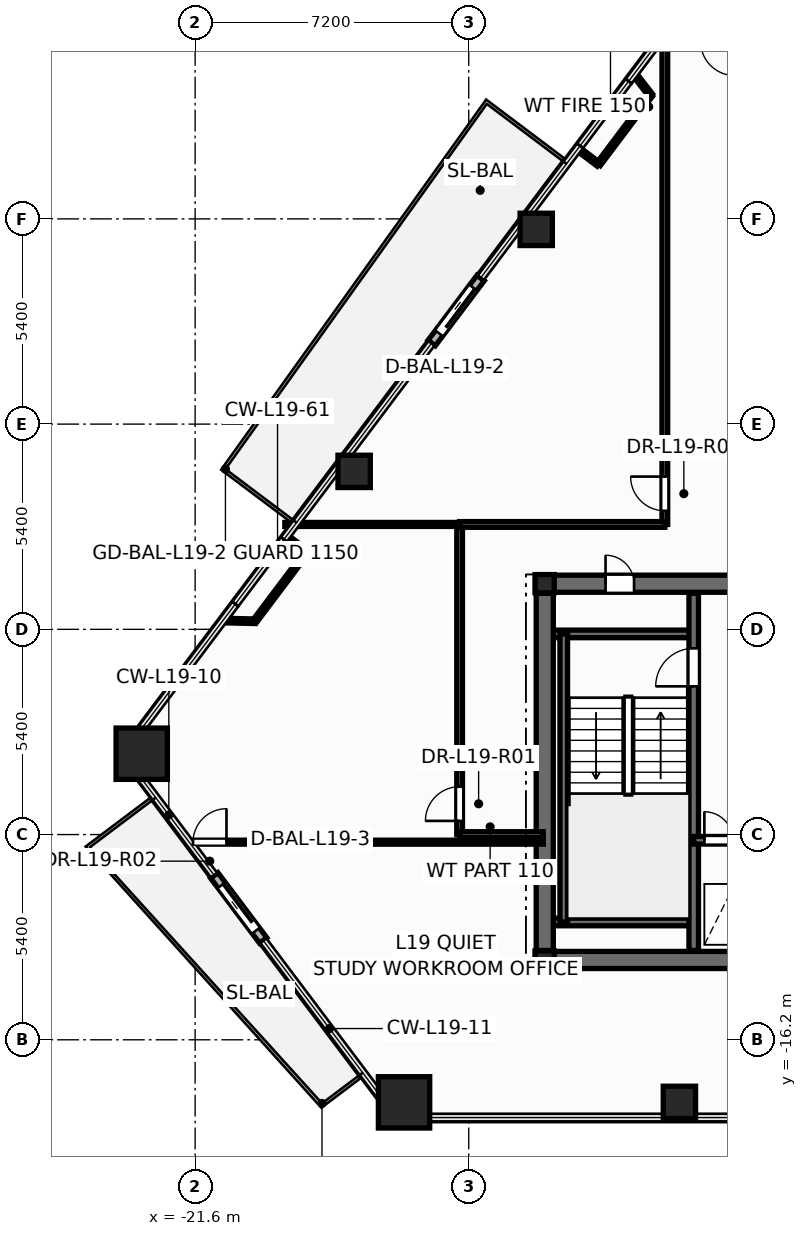
"""IFC4 building model, lengths in metres.
Left out: names, types, materials, properties, quantities, classifications, styles, units other than length and angle.
Written with IfcOpenShell. Run it as: python <this file> out.ifc"""

import sys

from ifc_helpers import new_model, si_unit, direction, frame, frame_2d, origin, origin_2d, place, context, subcontext, project, spatial, rectangle, hollow_rectangle, hollow_circle, i_section, extrude, element, fill, save


model = new_model("IFC4")
c1 = context("Model", 3, precision=1e-05, world=origin(), true_north=direction((0.0, 1.0)))
c2 = subcontext(c1, "Body", "Model", "MODEL_VIEW")
j1 = project(units=[si_unit("LENGTHUNIT", "METRE"), si_unit("PLANEANGLEUNIT", "RADIAN")], contexts=[c1])
p1 = place(None, origin())
s1 = spatial("IfcSite", under=j1, at=p1, CompositionType="ELEMENT")
p2 = place(p1, origin())
s2 = spatial("IfcBuilding", under=s1, at=p2, CompositionType="ELEMENT")
p3 = place(p2, frame((0.0, 0.0, 75.6)))
s3 = spatial("IfcBuildingStorey", under=s2, at=p3, CompositionType="ELEMENT", Elevation=75.6)
for number, where, z_axis, x_axis in (
    (1, (-23.005, -8.673, 0.0), (0.0, 0.0, 1.0), (1.0, 0.0, 0.0)),
    (2, (-16.103, -17.847, 0.0), (0.0, 0.0, 1.0), (1.0, 0.0, 0.0)),
):
    element("IfcColumn", number, at=place(p3, frame(where, z_axis=z_axis, x_axis=x_axis)), inside=s3, PredefinedType="COLUMN", context=c2, shape_type="SweptSolid", body=[
        extrude(hollow_rectangle(XDim=1.35, YDim=1.35, WallThickness=0.065, at=origin_2d()), origin(), (0.0, 0.0, 1.0), 3.6),
    ])
for number, where, z_axis, x_axis in (
    (3, (-8.856, -17.847, 0.0), (0.0, 0.0, 1.0), (1.0, 0.0, 0.0)),
    (4, (-12.624, 5.124, 0.0), (0.0, 0.0, 1.0), (1.0, 0.0, 0.0)),
    (5, (-17.416, -1.244, 0.0), (0.0, 0.0, 1.0), (1.0, 0.0, 0.0)),
):
    element("IfcColumn", number, at=place(p3, frame(where, z_axis=z_axis, x_axis=x_axis)), inside=s3, PredefinedType="COLUMN", context=c2, shape_type="SweptSolid", body=[
        extrude(hollow_circle(Radius=0.425, WallThickness=0.038, at=origin_2d()), origin(), (0.0, 0.0, 1.0), 3.6),
    ])
for number, where, z_axis, x_axis in (
    (6, (-12.4, -14.1, 0.0), (0.0, 0.0, 1.0), (1.0, 0.0, 0.0)),
    (7, (-12.4, -4.2, 0.0), (0.0, 0.0, 1.0), (1.0, 0.0, 0.0)),
):
    element("IfcColumn", number, at=place(p3, frame(where, z_axis=z_axis, x_axis=x_axis)), inside=s3, PredefinedType="COLUMN", context=c2, shape_type="SweptSolid", body=[
        extrude(i_section(OverallWidth=0.5, OverallDepth=0.482, WebThickness=0.04, FlangeThickness=0.045, at=origin_2d()), origin(), (0.0, 0.0, 1.0), 3.6),
    ])
p4 = place(p3, frame((-14.088, 3.844, -0.015), z_axis=(0.0, 0.0, 1.0), x_axis=(-0.601240548581, -0.799068083921, 0.0)))
e8 = element("IfcWall", 8, at=p4, inside=s3, PredefinedType="STANDARD", context=c2, shape_type="SweptSolid", body=[
    extrude(rectangle(XDim=2.14, YDim=0.24, at=frame_2d((1.07, 0.0))), origin(), (0.0, 0.0, 1.0), 2.729),
])
p5 = place(p4, frame((0.32, 0.0, 0.015)))
e9 = element("IfcOpeningElement", 9, at=p5, cuts=e8, PredefinedType="OPENING", context=c2, shape_type="SweptSolid", body=[
    extrude(rectangle(XDim=1.506, YDim=2.204, at=frame_2d((0.75, 1.102))), frame((0.0, 0.13, 0.0), z_axis=(0.0, -1.0, 0.0), x_axis=(1.0, 0.0, 0.0)), (0.0, 0.0, 1.0), 0.26),
])
p6 = place(p3, frame((-21.096, -11.875, -0.015), z_axis=(0.0, 0.0, 1.0), x_axis=(0.601240548581, -0.799068083921, 0.0)))
e10 = element("IfcWall", 10, at=p6, inside=s3, PredefinedType="STANDARD", context=c2, shape_type="SweptSolid", body=[
    extrude(rectangle(XDim=2.14, YDim=0.24, at=frame_2d((1.07, 0.0))), origin(), (0.0, 0.0, 1.0), 2.729),
])
p7 = place(p6, frame((0.32, 0.0, 0.015)))
e11 = element("IfcOpeningElement", 11, at=p7, cuts=e10, PredefinedType="OPENING", context=c2, shape_type="SweptSolid", body=[
    extrude(rectangle(XDim=1.506, YDim=2.204, at=frame_2d((0.75, 1.102))), frame((0.0, 0.13, 0.0), z_axis=(0.0, -1.0, 0.0), x_axis=(1.0, 0.0, 0.0)), (0.0, 0.0, 1.0), 0.26),
])
p8 = place(p3, frame((-12.65, -14.1, 0.0), z_axis=(0.0, 0.0, 1.0), x_axis=(1.0, 0.0, 0.0)))
e12 = element("IfcWall", 12, at=p8, inside=s3, PredefinedType="SHEAR", context=c2, shape_type="SweptSolid", body=[
    extrude(rectangle(XDim=25.3, YDim=0.45, at=frame_2d((12.65, 0.0))), origin(), (0.0, 0.0, 1.0), 3.6),
])
p9 = place(p3, frame((-12.65, -4.2, 0.0), z_axis=(0.0, 0.0, 1.0), x_axis=(1.0, 0.0, 0.0)))
e13 = element("IfcWall", 13, at=p9, inside=s3, PredefinedType="SHEAR", context=c2, shape_type="SweptSolid", body=[
    extrude(rectangle(XDim=25.3, YDim=0.45, at=frame_2d((12.65, 0.0))), origin(), (0.0, 0.0, 1.0), 3.6),
])
p10 = place(p9, frame((1.85, 0.0, 0.0)))
e14 = element("IfcOpeningElement", 14, at=p10, cuts=e13, PredefinedType="OPENING", context=c2, shape_type="SweptSolid", body=[
    extrude(rectangle(XDim=0.756, YDim=2.054, at=frame_2d((0.375, 1.027))), frame((0.0, 0.235, 0.0), z_axis=(0.0, -1.0, 0.0), x_axis=(1.0, 0.0, 0.0)), (0.0, 0.0, 1.0), 0.47),
])
p11 = place(p9, frame((21.85, 0.0, 0.0)))
e15 = element("IfcOpeningElement", 15, at=p11, cuts=e13, PredefinedType="OPENING", context=c2, shape_type="SweptSolid", body=[
    extrude(rectangle(XDim=0.756, YDim=2.054, at=frame_2d((0.375, 1.027))), frame((0.0, 0.235, 0.0), z_axis=(0.0, -1.0, 0.0), x_axis=(1.0, 0.0, 0.0)), (0.0, 0.0, 1.0), 0.47),
])
p12 = place(p9, frame((23.5, 0.0, 0.0)))
e16 = element("IfcOpeningElement", 16, at=p12, cuts=e13, PredefinedType="OPENING", context=c2, shape_type="SweptSolid", body=[
    extrude(rectangle(XDim=0.756, YDim=2.054, at=frame_2d((0.375, 1.027))), frame((0.0, 0.235, 0.0), z_axis=(0.0, -1.0, 0.0), x_axis=(1.0, 0.0, 0.0)), (0.0, 0.0, 1.0), 0.47),
])
p13 = place(p9, frame((5.85, 0.0, 0.0)))
e17 = element("IfcOpeningElement", 17, at=p13, cuts=e13, PredefinedType="OPENING", context=c2, shape_type="SweptSolid", body=[
    extrude(rectangle(XDim=1.006, YDim=2.104, at=frame_2d((0.5, 1.052))), frame((0.0, 0.235, 0.0), z_axis=(0.0, -1.0, 0.0), x_axis=(1.0, 0.0, 0.0)), (0.0, 0.0, 1.0), 0.47),
])
p14 = place(p9, frame((10.35, 0.0, 0.0)))
e18 = element("IfcOpeningElement", 18, at=p14, cuts=e13, PredefinedType="OPENING", context=c2, shape_type="SweptSolid", body=[
    extrude(rectangle(XDim=1.406, YDim=2.154, at=frame_2d((0.7, 1.077))), frame((0.0, 0.235, 0.0), z_axis=(0.0, -1.0, 0.0), x_axis=(1.0, 0.0, 0.0)), (0.0, 0.0, 1.0), 0.47),
])
p15 = place(p9, frame((18.45, 0.0, 0.0)))
e19 = element("IfcOpeningElement", 19, at=p15, cuts=e13, PredefinedType="OPENING", context=c2, shape_type="SweptSolid", body=[
    extrude(rectangle(XDim=1.006, YDim=2.104, at=frame_2d((0.5, 1.052))), frame((0.0, 0.235, 0.0), z_axis=(0.0, -1.0, 0.0), x_axis=(1.0, 0.0, 0.0)), (0.0, 0.0, 1.0), 0.47),
])
for number, where, z_axis, x_axis in (
    (20, (-12.35, -5.52, 0.0), (0.0, 0.0, 1.0), (1.0, 0.0, 0.0)),
    (21, (-12.35, -13.1, 0.0), (0.0, 0.0, 1.0), (1.0, 0.0, 0.0)),
):
    element("IfcWall", number, at=place(p3, frame(where, z_axis=z_axis, x_axis=x_axis)), inside=s3, PredefinedType="SOLIDWALL", context=c2, shape_type="SweptSolid", body=[
        extrude(rectangle(XDim=3.87, YDim=0.2, at=frame_2d((1.935, 0.0))), origin(), (0.0, 0.0, 1.0), 3.6),
    ])
p16 = place(p3, frame((-11.9, -13.1, 0.0), z_axis=(0.0, 0.0, 1.0), x_axis=(0.0, 1.0, 0.0)))
e22 = element("IfcWall", 22, at=p16, inside=s3, PredefinedType="SOLIDWALL", context=c2, shape_type="SweptSolid", body=[
    extrude(rectangle(XDim=7.58, YDim=0.2, at=frame_2d((3.79, 0.0))), origin(), (0.0, 0.0, 1.0), 3.6),
])
p17 = place(p3, frame((-8.48, -13.85, 0.0), z_axis=(0.0, 0.0, 1.0), x_axis=(0.0, 1.0, 0.0)))
e23 = element("IfcWall", 23, at=p17, inside=s3, PredefinedType="SHEAR", context=c2, shape_type="SweptSolid", body=[
    extrude(rectangle(XDim=9.4, YDim=0.25, at=frame_2d((4.7, 0.0))), origin(), (0.0, 0.0, 1.0), 3.6),
])
p18 = place(p17, frame((6.95, 0.0, 0.0)))
e24 = element("IfcOpeningElement", 24, at=p18, cuts=e23, PredefinedType="OPENING", context=c2, shape_type="SweptSolid", body=[
    extrude(rectangle(XDim=1.006, YDim=2.104, at=frame_2d((0.5, 1.052))), frame((0.0, 0.135, 0.0), z_axis=(0.0, -1.0, 0.0), x_axis=(1.0, 0.0, 0.0)), (0.0, 0.0, 1.0), 0.27),
])
p19 = place(p3, frame((-8.48, -10.95, 0.0), z_axis=(0.0, 0.0, 1.0), x_axis=(1.0, 0.0, 0.0)))
e25 = element("IfcWall", 25, at=p19, inside=s3, PredefinedType="SOLIDWALL", context=c2, shape_type="SweptSolid", body=[
    extrude(rectangle(XDim=3.36, YDim=0.2, at=frame_2d((1.68, 0.0))), origin(), (0.0, 0.0, 1.0), 3.6),
])
p20 = place(p19, frame((0.28, 0.0, 0.0)))
e26 = element("IfcOpeningElement", 26, at=p20, cuts=e25, PredefinedType="OPENING", context=c2, shape_type="SweptSolid", body=[
    extrude(rectangle(XDim=0.756, YDim=2.054, at=frame_2d((0.375, 1.027))), frame((0.0, 0.11, 0.0), z_axis=(0.0, -1.0, 0.0), x_axis=(1.0, 0.0, 0.0)), (0.0, 0.0, 1.0), 0.22),
])
p21 = place(p19, frame((1.85, 0.0, 0.0)))
e27 = element("IfcOpeningElement", 27, at=p21, cuts=e25, PredefinedType="OPENING", context=c2, shape_type="SweptSolid", body=[
    extrude(rectangle(XDim=1.106, YDim=2.104, at=frame_2d((0.55, 1.052))), frame((0.0, 0.11, 0.0), z_axis=(0.0, -1.0, 0.0), x_axis=(1.0, 0.0, 0.0)), (0.0, 0.0, 1.0), 0.22),
])
p22 = place(p3, frame((-12.4, -13.85, 0.0), z_axis=(0.0, 0.0, 1.0), x_axis=(0.0, 1.0, 0.0)))
e28 = element("IfcWall", 28, at=p22, inside=s3, PredefinedType="SHEAR", context=c2, shape_type="SweptSolid", body=[
    extrude(rectangle(XDim=9.4, YDim=0.45, at=frame_2d((4.7, 0.0))), origin(), (0.0, 0.0, 1.0), 3.6),
])
p23 = place(p3, frame((-9.24, -2.64, 0.0), z_axis=(0.0, 0.0, 1.0), x_axis=(0.0, 1.0, 0.0)))
e29 = element("IfcWall", 29, at=p23, inside=s3, PredefinedType="PARTITIONING", context=c2, shape_type="SweptSolid", body=[
    extrude(rectangle(XDim=12.927, YDim=0.15, at=frame_2d((6.463, 0.0))), origin(), (0.0, 0.0, 1.0), 2.509),
])
p24 = place(p23, frame((0.359, 0.0, 0.0)))
e30 = element("IfcOpeningElement", 30, at=p24, cuts=e29, PredefinedType="OPENING", context=c2, shape_type="SweptSolid", body=[
    extrude(rectangle(XDim=0.906, YDim=2.104, at=frame_2d((0.45, 1.052))), frame((0.0, 0.085, 0.0), z_axis=(0.0, -1.0, 0.0), x_axis=(1.0, 0.0, 0.0)), (0.0, 0.0, 1.0), 0.17),
])
p25 = place(p3, frame((-21.755, -11.0, 0.0), z_axis=(0.0, 0.0, 1.0), x_axis=(1.0, 0.0, 0.0)))
e31 = element("IfcWall", 31, at=p25, inside=s3, PredefinedType="PARTITIONING", context=c2, shape_type="SweptSolid", body=[
    extrude(rectangle(XDim=9.315, YDim=0.105, at=frame_2d((4.657, 0.0))), origin(), (0.0, 0.0, 1.0), 2.713),
])
p26 = place(p25, frame((0.1, 0.0, 0.0)))
e32 = element("IfcOpeningElement", 32, at=p26, cuts=e31, PredefinedType="OPENING", context=c2, shape_type="SweptSolid", body=[
    extrude(rectangle(XDim=0.886, YDim=2.104, at=frame_2d((0.44, 1.052))), frame((0.0, 0.062, 0.0), z_axis=(0.0, -1.0, 0.0), x_axis=(1.0, 0.0, 0.0)), (0.0, 0.0, 1.0), 0.125),
])
p27 = place(p3, frame((-14.64, -10.8, 0.0), z_axis=(0.0, 0.0, 1.0), x_axis=(0.0, 1.0, 0.0)))
e33 = element("IfcWall", 33, at=p27, inside=s3, PredefinedType="PARTITIONING", context=c2, shape_type="SweptSolid", body=[
    extrude(rectangle(XDim=8.16, YDim=0.15, at=frame_2d((4.08, 0.0))), origin(), (0.0, 0.0, 1.0), 2.325),
])
p28 = place(p27, frame((0.359, 0.0, 0.0)))
e34 = element("IfcOpeningElement", 34, at=p28, cuts=e33, PredefinedType="OPENING", context=c2, shape_type="SweptSolid", body=[
    extrude(rectangle(XDim=0.906, YDim=2.104, at=frame_2d((0.45, 1.052))), frame((0.0, 0.085, 0.0), z_axis=(0.0, -1.0, 0.0), x_axis=(1.0, 0.0, 0.0)), (0.0, 0.0, 1.0), 0.17),
])
p29 = place(p3, frame((-14.64, -2.64, 0.0), z_axis=(0.0, 0.0, 1.0), x_axis=(1.0, 0.0, 0.0)))
e35 = element("IfcWall", 35, at=p29, inside=s3, PredefinedType="PARTITIONING", context=c2, shape_type="SweptSolid", body=[
    extrude(rectangle(XDim=5.4, YDim=0.15, at=frame_2d((2.7, 0.0))), origin(), (0.0, 0.0, 1.0), 3.35),
])
p30 = place(p3, frame((-19.24, -2.64, 0.0), z_axis=(0.0, 0.0, 1.0), x_axis=(1.0, 0.0, 0.0)))
e36 = element("IfcWall", 36, at=p30, inside=s3, PredefinedType="PARTITIONING", context=c2, shape_type="SweptSolid", body=[
    extrude(rectangle(XDim=4.6, YDim=0.105, at=frame_2d((2.3, 0.0))), origin(), (0.0, 0.0, 1.0), 2.713),
])
for number, where, z_axis, x_axis in (
    (37, (-9.615, 8.657, 0.0), (0.0, 0.0, 1.0), (-0.601, -0.799, 0.0)),
    (38, (-18.662, -3.366, 0.0), (0.0, 0.0, 1.0), (-0.601, -0.799, 0.0)),
):
    element("IfcWall", number, at=place(p3, frame(where, z_axis=z_axis, x_axis=x_axis)), inside=s3, PredefinedType="PARTITIONING", context=c2, shape_type="SweptSolid", body=[
        extrude(rectangle(XDim=2.279, YDim=0.12, at=frame_2d((1.14, 0.0))), origin(), (0.0, 0.0, 1.0), 3.35),
    ])
p31 = place(p3, frame((-14.64, -10.8, 0.0), z_axis=(0.0, 0.0, 1.0), x_axis=(1.0, 0.0, 0.0)))
e39 = element("IfcWall", 39, at=p31, inside=s3, PredefinedType="PARTITIONING", context=c2, shape_type="SweptSolid", body=[
    extrude(rectangle(XDim=2.2, YDim=0.15, at=frame_2d((1.1, 0.0))), origin(), (0.0, 0.0, 1.0), 2.713),
])
p32 = place(p3, frame((-20.032, -5.187, 0.0), z_axis=(0.0, 0.0, 1.0), x_axis=(-0.999739997708, 0.022802126725, 0.0)))
e40 = element("IfcWall", 40, at=p32, inside=s3, PredefinedType="PARTITIONING", context=c2, shape_type="SweptSolid", body=[
    extrude(rectangle(XDim=0.824, YDim=0.12, at=frame_2d((0.412, 0.0))), origin(), (0.0, 0.0, 1.0), 2.713),
])
p33 = place(p3, frame((-10.041, 9.206, 0.0), z_axis=(0.0, 0.0, 1.0), x_axis=(0.613137094739, -0.789976520572, 0.0)))
e41 = element("IfcWall", 41, at=p33, inside=s3, PredefinedType="PARTITIONING", context=c2, shape_type="SweptSolid", body=[
    extrude(rectangle(XDim=0.694, YDim=0.12, at=frame_2d((0.347, 0.0))), origin(), (0.0, 0.0, 1.0), 2.713),
])
for number, where, z_axis, x_axis in (
    (42, (-19.197, -2.963, 0.0), (0.0, 0.0, 1.0), (0.799, -0.601, 0.0)),
    (43, (-10.986, 6.836, 0.0), (0.0, 0.0, 1.0), (-0.799, 0.601, 0.0)),
):
    element("IfcWall", number, at=place(p3, frame(where, z_axis=z_axis, x_axis=x_axis)), inside=s3, PredefinedType="PARTITIONING", context=c2, shape_type="SweptSolid", body=[
        extrude(rectangle(XDim=0.67, YDim=0.12, at=frame_2d((0.335, 0.0))), origin(), (0.0, 0.0, 1.0), 2.713),
    ])
p34 = place(p5, origin())
e44 = element("IfcDoor", 44, at=p34, inside=s3, OperationType="SLIDING_TO_RIGHT", PredefinedType="DOOR", context=c2, shape_type="SweptSolid", body=[
    extrude(rectangle(XDim=1.5, YDim=2.2, at=frame_2d((0.75, 1.1))), frame((0.0, 0.025, 0.0), z_axis=(0.0, -1.0, 0.0), x_axis=(1.0, 0.0, 0.0)), (0.0, 0.0, 1.0), 0.05),
])
fill(e9, e44)
p35 = place(p7, origin())
e45 = element("IfcDoor", 45, at=p35, inside=s3, OperationType="SLIDING_TO_RIGHT", PredefinedType="DOOR", context=c2, shape_type="SweptSolid", body=[
    extrude(rectangle(XDim=1.5, YDim=2.2, at=frame_2d((0.75, 1.1))), frame((0.0, 0.025, 0.0), z_axis=(0.0, -1.0, 0.0), x_axis=(1.0, 0.0, 0.0)), (0.0, 0.0, 1.0), 0.05),
])
fill(e11, e45)
p36 = place(p18, origin())
e46 = element("IfcDoor", 46, at=p36, inside=s3, OperationType="SINGLE_SWING_LEFT", PredefinedType="DOOR", context=c2, shape_type="SweptSolid", body=[
    extrude(rectangle(XDim=1.0, YDim=2.1, at=frame_2d((0.5, 1.05))), frame((0.0, 0.025, 0.0), z_axis=(0.0, -1.0, 0.0), x_axis=(1.0, 0.0, 0.0)), (0.0, 0.0, 1.0), 0.05),
])
fill(e24, e46)
p37 = place(p20, origin())
e47 = element("IfcDoor", 47, at=p37, inside=s3, OperationType="SINGLE_SWING_LEFT", PredefinedType="DOOR", context=c2, shape_type="SweptSolid", body=[
    extrude(rectangle(XDim=0.75, YDim=2.05, at=frame_2d((0.375, 1.025))), frame((0.0, 0.025, 0.0), z_axis=(0.0, -1.0, 0.0), x_axis=(1.0, 0.0, 0.0)), (0.0, 0.0, 1.0), 0.05),
])
fill(e26, e47)
p38 = place(p10, origin())
e48 = element("IfcDoor", 48, at=p38, inside=s3, OperationType="SINGLE_SWING_LEFT", PredefinedType="DOOR", context=c2, shape_type="SweptSolid", body=[
    extrude(rectangle(XDim=0.75, YDim=2.05, at=frame_2d((0.375, 1.025))), frame((0.0, 0.025, 0.0), z_axis=(0.0, -1.0, 0.0), x_axis=(1.0, 0.0, 0.0)), (0.0, 0.0, 1.0), 0.05),
])
fill(e14, e48)
p39 = place(p28, origin())
e49 = element("IfcDoor", 49, at=p39, inside=s3, OperationType="SINGLE_SWING_LEFT", PredefinedType="DOOR", context=c2, shape_type="SweptSolid", body=[
    extrude(rectangle(XDim=0.9, YDim=2.1, at=frame_2d((0.45, 1.05))), frame((0.0, 0.025, 0.0), z_axis=(0.0, -1.0, 0.0), x_axis=(1.0, 0.0, 0.0)), (0.0, 0.0, 1.0), 0.05),
])
fill(e34, e49)
p40 = place(p26, origin())
e50 = element("IfcDoor", 50, at=p40, inside=s3, OperationType="SINGLE_SWING_RIGHT", PredefinedType="DOOR", context=c2, shape_type="SweptSolid", body=[
    extrude(rectangle(XDim=0.88, YDim=2.1, at=frame_2d((0.44, 1.05))), frame((0.0, 0.025, 0.0), z_axis=(0.0, -1.0, 0.0), x_axis=(1.0, 0.0, 0.0)), (0.0, 0.0, 1.0), 0.05),
])
fill(e32, e50)
p41 = place(p24, origin())
e51 = element("IfcDoor", 51, at=p41, inside=s3, OperationType="SINGLE_SWING_RIGHT", PredefinedType="DOOR", context=c2, shape_type="SweptSolid", body=[
    extrude(rectangle(XDim=0.9, YDim=2.1, at=frame_2d((0.45, 1.05))), frame((0.0, 0.025, 0.0), z_axis=(0.0, -1.0, 0.0), x_axis=(1.0, 0.0, 0.0)), (0.0, 0.0, 1.0), 0.05),
])
fill(e30, e51)
save(model, sys.argv[1])
